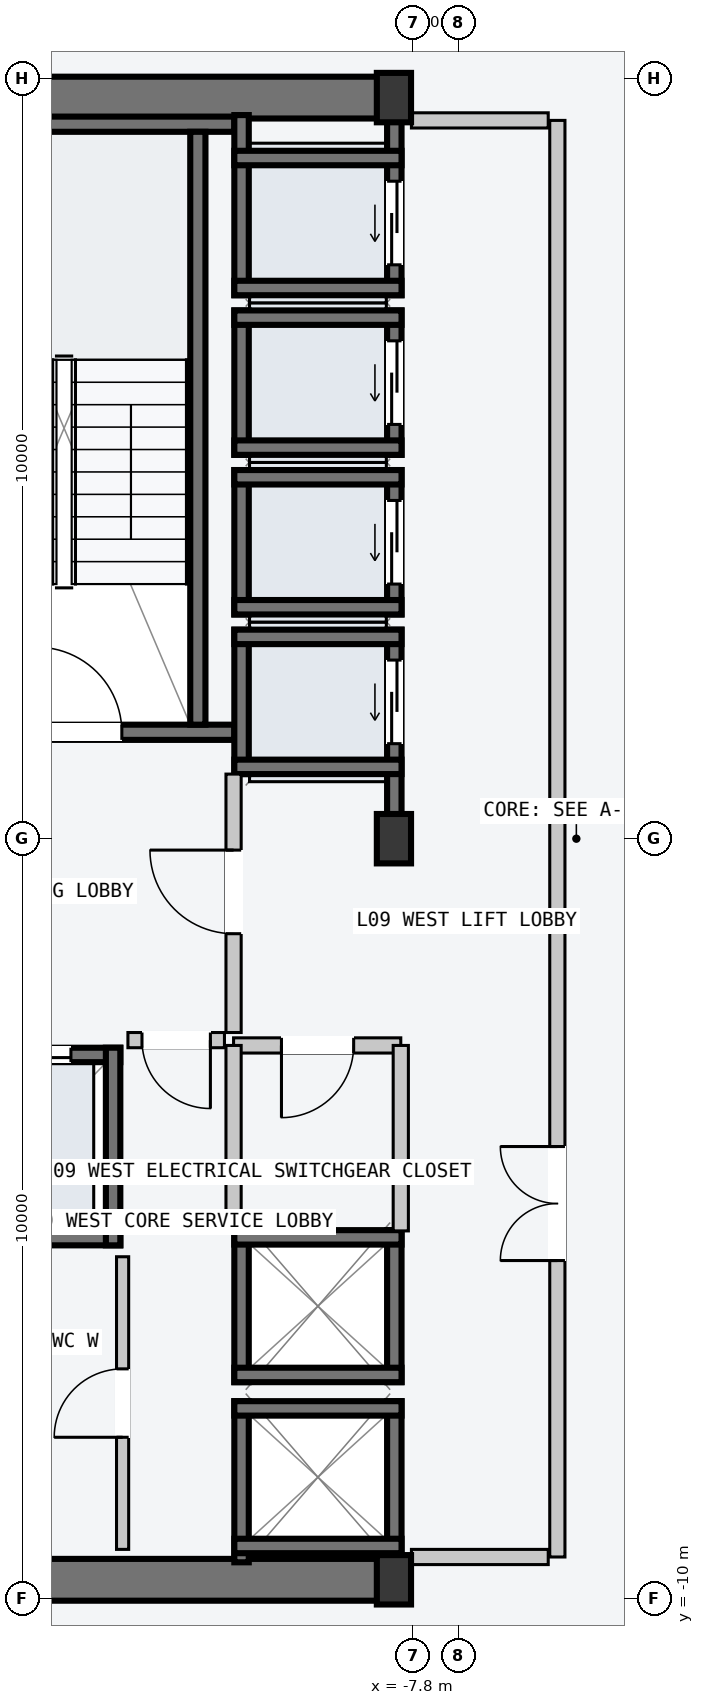
"""IFC4 building model, lengths in metres.
Left out: names, types, materials, properties, quantities, classifications, styles, units other than length and angle.
Written with IfcOpenShell. Run it as: python <this file> out.ifc"""

import sys

from ifc_helpers import new_model, si_unit, direction, frame, frame_2d, origin, origin_2d, place, context, subcontext, project, spatial, rectangle, i_section, extrude, element, fill, save


model = new_model("IFC4")
c1 = context("Model", 3, precision=1e-05, world=origin(), true_north=direction((0.0, 1.0)))
c2 = subcontext(c1, "Body", "Model", "MODEL_VIEW")
j1 = project(units=[si_unit("LENGTHUNIT", "METRE"), si_unit("PLANEANGLEUNIT", "RADIAN")], contexts=[c1])
p1 = place(None, origin())
s1 = spatial("IfcSite", under=j1, at=p1, CompositionType="ELEMENT")
p2 = place(p1, origin())
s2 = spatial("IfcBuilding", under=s1, at=p2, CompositionType="ELEMENT")
p3 = place(p2, frame((0.0, 0.0, 38.4)))
s3 = spatial("IfcBuildingStorey", under=s2, at=p3, CompositionType="ELEMENT", Elevation=38.4)
for number, where, z_axis, x_axis in (
    (1, (-14.53, -9.75, -0.2), (0.0, 0.0, 1.0), (1.0, 0.0, 0.0)),
    (2, (-14.53, 9.75, -0.2), (0.0, 0.0, 1.0), (1.0, 0.0, 0.0)),
):
    element("IfcWall", number, at=place(p3, frame(where, z_axis=z_axis, x_axis=x_axis)), inside=s3, PredefinedType="SHEAR", context=c2, shape_type="SweptSolid", body=[
        extrude(rectangle(XDim=6.46, YDim=0.55, at=frame_2d((3.23, 0.0))), origin(), (0.0, 0.0, 1.0), 3.6),
    ])
p4 = place(p3, frame((-14.25, 1.4, -0.2), z_axis=(0.0, 0.0, 1.0), x_axis=(1.0, 0.0, 0.0)))
e3 = element("IfcWall", 3, at=p4, inside=s3, PredefinedType="SOLIDWALL", context=c2, shape_type="SweptSolid", body=[
    extrude(rectangle(XDim=4.1, YDim=0.2, at=frame_2d((2.05, 0.0))), origin(), (0.0, 0.0, 1.0), 3.6),
])
p5 = place(p4, frame((1.5, 0.0, 0.2)))
e4 = element("IfcOpeningElement", 4, at=p5, cuts=e3, PredefinedType="OPENING", context=c2, shape_type="SweptSolid", body=[
    extrude(rectangle(XDim=1.12, YDim=2.18, at=frame_2d((0.56, 1.09))), frame((0.0, 0.11, 0.0), z_axis=(0.0, -1.0, 0.0), x_axis=(1.0, 0.0, 0.0)), (0.0, 0.0, 1.0), 0.22),
])
p6 = place(p3, frame((-14.25, 9.4, -0.2), z_axis=(0.0, 0.0, 1.0), x_axis=(1.0, 0.0, 0.0)))
e5 = element("IfcWall", 5, at=p6, inside=s3, PredefinedType="SOLIDWALL", context=c2, shape_type="SweptSolid", body=[
    extrude(rectangle(XDim=4.1, YDim=0.2, at=frame_2d((2.05, 0.0))), origin(), (0.0, 0.0, 1.0), 3.6),
])
p7 = place(p3, frame((-10.63, 1.5, -0.2), z_axis=(0.0, 0.0, 1.0), x_axis=(0.0, 1.0, 0.0)))
e6 = element("IfcWall", 6, at=p7, inside=s3, PredefinedType="SOLIDWALL", context=c2, shape_type="SweptSolid", body=[
    extrude(rectangle(XDim=7.8, YDim=0.2, at=frame_2d((3.9, 0.0))), origin(), (0.0, 0.0, 1.0), 3.6),
])
for number, where, z_axis, x_axis in (
    (7, (-8.05, -9.75, 0.0), (0.0, 0.0, 1.0), (1.0, 0.0, 0.0)),
    (8, (-8.05, 0.0, 0.0), (0.0, 0.0, 1.0), (1.0, 0.0, 0.0)),
    (9, (-8.05, 9.75, 0.0), (0.0, 0.0, 1.0), (1.0, 0.0, 0.0)),
):
    element("IfcColumn", number, at=place(p3, frame(where, z_axis=z_axis, x_axis=x_axis)), inside=s3, PredefinedType="COLUMN", context=c2, shape_type="SweptSolid", body=[
        extrude(i_section(OverallWidth=0.45, OverallDepth=0.65, WebThickness=0.025, FlangeThickness=0.04, at=origin_2d()), origin(), (0.0, 0.0, 1.0), 3.6),
    ])
p8 = place(p3, frame((-8.045, 0.21, -0.2), z_axis=(0.0, 0.0, 1.0), x_axis=(0.0, 1.0, 0.0)))
e10 = element("IfcWall", 10, at=p8, inside=s3, PredefinedType="SOLIDWALL", context=c2, shape_type="SweptSolid", body=[
    extrude(rectangle(XDim=2.54, YDim=0.19, at=frame_2d((1.27, 0.0))), origin(), (0.0, 0.0, 1.0), 3.6),
])
p9 = place(p8, frame((1.04, 0.0, 0.2)))
e11 = element("IfcOpeningElement", 11, at=p9, cuts=e10, PredefinedType="OPENING", context=c2, shape_type="SweptSolid", body=[
    extrude(rectangle(XDim=1.1, YDim=2.2, at=frame_2d((0.55, 1.1))), frame((0.0, 0.105, 0.0), z_axis=(0.0, -1.0, 0.0), x_axis=(1.0, 0.0, 0.0)), (0.0, 0.0, 1.0), 0.21),
])
p10 = place(p3, frame((-10.055, 0.85, -0.2), z_axis=(0.0, 0.0, 1.0), x_axis=(0.0, 1.0, 0.0)))
e12 = element("IfcWall", 12, at=p10, inside=s3, PredefinedType="SOLIDWALL", context=c2, shape_type="SweptSolid", body=[
    extrude(rectangle(XDim=1.9, YDim=0.19, at=frame_2d((0.95, 0.0))), origin(), (0.0, 0.0, 1.0), 3.6),
])
for number, where, z_axis, x_axis in (
    (13, (-10.15, 2.655, -0.2), (0.0, 0.0, 1.0), (1.0, 0.0, 0.0)),
    (14, (-10.15, 0.945, -0.2), (0.0, 0.0, 1.0), (1.0, 0.0, 0.0)),
):
    element("IfcWall", number, at=place(p3, frame(where, z_axis=z_axis, x_axis=x_axis)), inside=s3, PredefinedType="SOLIDWALL", context=c2, shape_type="SweptSolid", body=[
        extrude(rectangle(XDim=2.2, YDim=0.19, at=frame_2d((1.1, 0.0))), origin(), (0.0, 0.0, 1.0), 3.6),
    ])
p11 = place(p3, frame((-8.045, 2.95, -0.2), z_axis=(0.0, 0.0, 1.0), x_axis=(0.0, 1.0, 0.0)))
e15 = element("IfcWall", 15, at=p11, inside=s3, PredefinedType="SOLIDWALL", context=c2, shape_type="SweptSolid", body=[
    extrude(rectangle(XDim=1.9, YDim=0.19, at=frame_2d((0.95, 0.0))), origin(), (0.0, 0.0, 1.0), 3.6),
])
p12 = place(p11, frame((0.4, 0.0, 0.2)))
e16 = element("IfcOpeningElement", 16, at=p12, cuts=e15, PredefinedType="OPENING", context=c2, shape_type="SweptSolid", body=[
    extrude(rectangle(XDim=1.1, YDim=2.2, at=frame_2d((0.55, 1.1))), frame((0.0, 0.105, 0.0), z_axis=(0.0, -1.0, 0.0), x_axis=(1.0, 0.0, 0.0)), (0.0, 0.0, 1.0), 0.21),
])
p13 = place(p3, frame((-10.055, 2.95, -0.2), z_axis=(0.0, 0.0, 1.0), x_axis=(0.0, 1.0, 0.0)))
e17 = element("IfcWall", 17, at=p13, inside=s3, PredefinedType="SOLIDWALL", context=c2, shape_type="SweptSolid", body=[
    extrude(rectangle(XDim=1.9, YDim=0.19, at=frame_2d((0.95, 0.0))), origin(), (0.0, 0.0, 1.0), 3.6),
])
for number, where, z_axis, x_axis in (
    (18, (-10.15, 4.755, -0.2), (0.0, 0.0, 1.0), (1.0, 0.0, 0.0)),
    (19, (-10.15, 3.045, -0.2), (0.0, 0.0, 1.0), (1.0, 0.0, 0.0)),
):
    element("IfcWall", number, at=place(p3, frame(where, z_axis=z_axis, x_axis=x_axis)), inside=s3, PredefinedType="SOLIDWALL", context=c2, shape_type="SweptSolid", body=[
        extrude(rectangle(XDim=2.2, YDim=0.19, at=frame_2d((1.1, 0.0))), origin(), (0.0, 0.0, 1.0), 3.6),
    ])
p14 = place(p3, frame((-8.045, 5.05, -0.2), z_axis=(0.0, 0.0, 1.0), x_axis=(0.0, 1.0, 0.0)))
e20 = element("IfcWall", 20, at=p14, inside=s3, PredefinedType="SOLIDWALL", context=c2, shape_type="SweptSolid", body=[
    extrude(rectangle(XDim=1.9, YDim=0.19, at=frame_2d((0.95, 0.0))), origin(), (0.0, 0.0, 1.0), 3.6),
])
p15 = place(p14, frame((0.4, 0.0, 0.2)))
e21 = element("IfcOpeningElement", 21, at=p15, cuts=e20, PredefinedType="OPENING", context=c2, shape_type="SweptSolid", body=[
    extrude(rectangle(XDim=1.1, YDim=2.2, at=frame_2d((0.55, 1.1))), frame((0.0, 0.105, 0.0), z_axis=(0.0, -1.0, 0.0), x_axis=(1.0, 0.0, 0.0)), (0.0, 0.0, 1.0), 0.21),
])
p16 = place(p3, frame((-10.055, 5.05, -0.2), z_axis=(0.0, 0.0, 1.0), x_axis=(0.0, 1.0, 0.0)))
e22 = element("IfcWall", 22, at=p16, inside=s3, PredefinedType="SOLIDWALL", context=c2, shape_type="SweptSolid", body=[
    extrude(rectangle(XDim=1.9, YDim=0.19, at=frame_2d((0.95, 0.0))), origin(), (0.0, 0.0, 1.0), 3.6),
])
for number, where, z_axis, x_axis in (
    (23, (-10.15, 6.855, -0.2), (0.0, 0.0, 1.0), (1.0, 0.0, 0.0)),
    (24, (-10.15, 5.145, -0.2), (0.0, 0.0, 1.0), (1.0, 0.0, 0.0)),
):
    element("IfcWall", number, at=place(p3, frame(where, z_axis=z_axis, x_axis=x_axis)), inside=s3, PredefinedType="SOLIDWALL", context=c2, shape_type="SweptSolid", body=[
        extrude(rectangle(XDim=2.2, YDim=0.19, at=frame_2d((1.1, 0.0))), origin(), (0.0, 0.0, 1.0), 3.6),
    ])
p17 = place(p3, frame((-8.045, 7.15, -0.2), z_axis=(0.0, 0.0, 1.0), x_axis=(0.0, 1.0, 0.0)))
e25 = element("IfcWall", 25, at=p17, inside=s3, PredefinedType="SOLIDWALL", context=c2, shape_type="SweptSolid", body=[
    extrude(rectangle(XDim=2.37, YDim=0.19, at=frame_2d((1.185, 0.0))), origin(), (0.0, 0.0, 1.0), 3.6),
])
p18 = place(p17, frame((0.4, 0.0, 0.2)))
e26 = element("IfcOpeningElement", 26, at=p18, cuts=e25, PredefinedType="OPENING", context=c2, shape_type="SweptSolid", body=[
    extrude(rectangle(XDim=1.1, YDim=2.2, at=frame_2d((0.55, 1.1))), frame((0.0, 0.105, 0.0), z_axis=(0.0, -1.0, 0.0), x_axis=(1.0, 0.0, 0.0)), (0.0, 0.0, 1.0), 0.21),
])
p19 = place(p3, frame((-10.055, 7.15, -0.2), z_axis=(0.0, 0.0, 1.0), x_axis=(0.0, 1.0, 0.0)))
e27 = element("IfcWall", 27, at=p19, inside=s3, PredefinedType="SOLIDWALL", context=c2, shape_type="SweptSolid", body=[
    extrude(rectangle(XDim=2.37, YDim=0.19, at=frame_2d((1.185, 0.0))), origin(), (0.0, 0.0, 1.0), 3.6),
])
for number, where, z_axis, x_axis in (
    (28, (-10.15, 8.955, -0.2), (0.0, 0.0, 1.0), (1.0, 0.0, 0.0)),
    (29, (-10.15, 7.245, -0.2), (0.0, 0.0, 1.0), (1.0, 0.0, 0.0)),
):
    element("IfcWall", number, at=place(p3, frame(where, z_axis=z_axis, x_axis=x_axis)), inside=s3, PredefinedType="SOLIDWALL", context=c2, shape_type="SweptSolid", body=[
        extrude(rectangle(XDim=2.2, YDim=0.19, at=frame_2d((1.1, 0.0))), origin(), (0.0, 0.0, 1.0), 3.6),
    ])
for number, where, z_axis, x_axis in (
    (30, (-8.045, -9.52, -0.2), (0.0, 0.0, 1.0), (0.0, 1.0, 0.0)),
    (31, (-10.055, -9.52, -0.2), (0.0, 0.0, 1.0), (0.0, 1.0, 0.0)),
):
    element("IfcWall", number, at=place(p3, frame(where, z_axis=z_axis, x_axis=x_axis)), inside=s3, PredefinedType="SOLIDWALL", context=c2, shape_type="SweptSolid", body=[
        extrude(rectangle(XDim=2.12, YDim=0.19, at=frame_2d((1.06, 0.0))), origin(), (0.0, 0.0, 1.0), 3.6),
    ])
for number, where, z_axis, x_axis in (
    (32, (-10.15, -7.495, -0.2), (0.0, 0.0, 1.0), (1.0, 0.0, 0.0)),
    (33, (-10.15, -9.305, -0.2), (0.0, 0.0, 1.0), (1.0, 0.0, 0.0)),
):
    element("IfcWall", number, at=place(p3, frame(where, z_axis=z_axis, x_axis=x_axis)), inside=s3, PredefinedType="SOLIDWALL", context=c2, shape_type="SweptSolid", body=[
        extrude(rectangle(XDim=2.2, YDim=0.19, at=frame_2d((1.1, 0.0))), origin(), (0.0, 0.0, 1.0), 3.6),
    ])
for number, where, z_axis, x_axis in (
    (34, (-8.045, -7.15, -0.2), (0.0, 0.0, 1.0), (0.0, 1.0, 0.0)),
    (35, (-10.055, -7.15, -0.2), (0.0, 0.0, 1.0), (0.0, 1.0, 0.0)),
):
    element("IfcWall", number, at=place(p3, frame(where, z_axis=z_axis, x_axis=x_axis)), inside=s3, PredefinedType="SOLIDWALL", context=c2, shape_type="SweptSolid", body=[
        extrude(rectangle(XDim=2.0, YDim=0.19, at=frame_2d((1.0, 0.0))), origin(), (0.0, 0.0, 1.0), 3.6),
    ])
for number, where, z_axis, x_axis in (
    (36, (-10.15, -5.245, -0.2), (0.0, 0.0, 1.0), (1.0, 0.0, 0.0)),
    (37, (-10.15, -7.055, -0.2), (0.0, 0.0, 1.0), (1.0, 0.0, 0.0)),
):
    element("IfcWall", number, at=place(p3, frame(where, z_axis=z_axis, x_axis=x_axis)), inside=s3, PredefinedType="SOLIDWALL", context=c2, shape_type="SweptSolid", body=[
        extrude(rectangle(XDim=2.2, YDim=0.19, at=frame_2d((1.1, 0.0))), origin(), (0.0, 0.0, 1.0), 3.6),
    ])
p20 = place(p3, frame((-14.33, -2.845, -0.2), z_axis=(0.0, 0.0, 1.0), x_axis=(1.0, 0.0, 0.0)))
e38 = element("IfcWall", 38, at=p20, inside=s3, PredefinedType="SOLIDWALL", context=c2, shape_type="SweptSolid", body=[
    extrude(rectangle(XDim=2.68, YDim=0.19, at=frame_2d((1.34, 0.0))), origin(), (0.0, 0.0, 1.0), 3.6),
])
p21 = place(p20, frame((0.83, 0.0, 0.2)))
e39 = element("IfcOpeningElement", 39, at=p21, cuts=e38, PredefinedType="OPENING", context=c2, shape_type="SweptSolid", body=[
    extrude(rectangle(XDim=1.2, YDim=2.2, at=frame_2d((0.6, 1.1))), frame((0.0, 0.105, 0.0), z_axis=(0.0, -1.0, 0.0), x_axis=(1.0, 0.0, 0.0)), (0.0, 0.0, 1.0), 0.21),
])
p22 = place(p3, frame((-14.33, -5.255, -0.2), z_axis=(0.0, 0.0, 1.0), x_axis=(1.0, 0.0, 0.0)))
e40 = element("IfcWall", 40, at=p22, inside=s3, PredefinedType="SOLIDWALL", context=c2, shape_type="SweptSolid", body=[
    extrude(rectangle(XDim=2.68, YDim=0.19, at=frame_2d((1.34, 0.0))), origin(), (0.0, 0.0, 1.0), 3.6),
])
p23 = place(p3, frame((-11.745, -5.35, -0.2), z_axis=(0.0, 0.0, 1.0), x_axis=(0.0, 1.0, 0.0)))
e41 = element("IfcWall", 41, at=p23, inside=s3, PredefinedType="SOLIDWALL", context=c2, shape_type="SweptSolid", body=[
    extrude(rectangle(XDim=2.6, YDim=0.19, at=frame_2d((1.3, 0.0))), origin(), (0.0, 0.0, 1.0), 3.6),
])
p24 = place(p3, frame((-5.9, -9.45, 0.0), z_axis=(0.0, 0.0, 1.0), x_axis=(0.0, 1.0, 0.0)))
e42 = element("IfcWall", 42, at=p24, inside=s3, PredefinedType="PARTITIONING", context=c2, shape_type="SweptSolid", body=[
    extrude(rectangle(XDim=18.9, YDim=0.2, at=frame_2d((9.45, 0.0))), origin(), (0.0, 0.0, 1.0), 3.4),
])
p25 = place(p24, frame((3.9, 0.0, 0.0)))
e43 = element("IfcOpeningElement", 43, at=p25, cuts=e42, PredefinedType="OPENING", context=c2, shape_type="SweptSolid", body=[
    extrude(rectangle(XDim=1.5, YDim=2.2, at=frame_2d((0.75, 1.1))), frame((0.0, 0.11, 0.0), z_axis=(0.0, -1.0, 0.0), x_axis=(1.0, 0.0, 0.0)), (0.0, 0.0, 1.0), 0.22),
])
for number, where, z_axis, x_axis in (
    (44, (-6.02, -9.45, 0.0), (0.0, 0.0, 1.0), (-1.0, 0.0, 0.0)),
    (45, (-6.02, 9.45, 0.0), (0.0, 0.0, 1.0), (-1.0, 0.0, 0.0)),
):
    element("IfcWall", number, at=place(p3, frame(where, z_axis=z_axis, x_axis=x_axis)), inside=s3, PredefinedType="PARTITIONING", context=c2, shape_type="SweptSolid", body=[
        extrude(rectangle(XDim=1.8, YDim=0.2, at=frame_2d((0.9, 0.0))), origin(), (0.0, 0.0, 1.0), 3.4),
    ])
p26 = place(p3, frame((-10.16, -2.55, 0.0), z_axis=(0.0, 0.0, 1.0), x_axis=(0.0, 1.0, 0.0)))
e46 = element("IfcWall", 46, at=p26, inside=s3, PredefinedType="PARTITIONING", context=c2, shape_type="SweptSolid", body=[
    extrude(rectangle(XDim=3.4, YDim=0.2, at=frame_2d((1.7, 0.0))), origin(), (0.0, 0.0, 1.0), 3.4),
])
p27 = place(p26, frame((1.3, 0.0, 0.0)))
e47 = element("IfcOpeningElement", 47, at=p27, cuts=e46, PredefinedType="OPENING", context=c2, shape_type="SweptSolid", body=[
    extrude(rectangle(XDim=1.1, YDim=2.15, at=frame_2d((0.55, 1.075))), frame((0.0, 0.11, 0.0), z_axis=(0.0, -1.0, 0.0), x_axis=(1.0, 0.0, 0.0)), (0.0, 0.0, 1.0), 0.22),
])
p28 = place(p3, frame((-10.28, -2.65, 0.0), z_axis=(0.0, 0.0, 1.0), x_axis=(-1.0, 0.0, 0.0)))
e48 = element("IfcWall", 48, at=p28, inside=s3, PredefinedType="PARTITIONING", context=c2, shape_type="SweptSolid", body=[
    extrude(rectangle(XDim=1.27, YDim=0.2, at=frame_2d((0.635, 0.0))), origin(), (0.0, 0.0, 1.0), 3.4),
])
p29 = place(p28, frame((0.185, 0.0, 0.0)))
e49 = element("IfcOpeningElement", 49, at=p29, cuts=e48, PredefinedType="OPENING", context=c2, shape_type="SweptSolid", body=[
    extrude(rectangle(XDim=0.9, YDim=2.15, at=frame_2d((0.45, 1.075))), frame((0.0, 0.11, 0.0), z_axis=(0.0, -1.0, 0.0), x_axis=(1.0, 0.0, 0.0)), (0.0, 0.0, 1.0), 0.22),
])
p30 = place(p3, frame((-7.96, -2.72, 0.0), z_axis=(0.0, 0.0, 1.0), x_axis=(-1.0, 0.0, 0.0)))
e50 = element("IfcWall", 50, at=p30, inside=s3, PredefinedType="PARTITIONING", context=c2, shape_type="SweptSolid", body=[
    extrude(rectangle(XDim=2.2, YDim=0.2, at=frame_2d((1.1, 0.0))), origin(), (0.0, 0.0, 1.0), 3.4),
])
p31 = place(p30, frame((0.62, 0.0, 0.0)))
e51 = element("IfcOpeningElement", 51, at=p31, cuts=e50, PredefinedType="OPENING", context=c2, shape_type="SweptSolid", body=[
    extrude(rectangle(XDim=0.95, YDim=2.1, at=frame_2d((0.475, 1.05))), frame((0.0, 0.11, 0.0), z_axis=(0.0, -1.0, 0.0), x_axis=(1.0, 0.0, 0.0)), (0.0, 0.0, 1.0), 0.22),
])
for number, where, z_axis, x_axis in (
    (52, (-7.96, -5.16, 0.0), (0.0, 0.0, 1.0), (0.0, 1.0, 0.0)),
    (53, (-10.16, -5.16, 0.0), (0.0, 0.0, 1.0), (0.0, 1.0, 0.0)),
):
    element("IfcWall", number, at=place(p3, frame(where, z_axis=z_axis, x_axis=x_axis)), inside=s3, PredefinedType="PARTITIONING", context=c2, shape_type="SweptSolid", body=[
        extrude(rectangle(XDim=2.44, YDim=0.2, at=frame_2d((1.22, 0.0))), origin(), (0.0, 0.0, 1.0), 3.4),
    ])
p32 = place(p3, frame((-11.62, -9.35, 0.0), z_axis=(0.0, 0.0, 1.0), x_axis=(0.0, 1.0, 0.0)))
e54 = element("IfcWall", 54, at=p32, inside=s3, PredefinedType="PARTITIONING", context=c2, shape_type="SweptSolid", body=[
    extrude(rectangle(XDim=3.85, YDim=0.16, at=frame_2d((1.925, 0.0))), origin(), (0.0, 0.0, 1.0), 3.4),
])
p33 = place(p32, frame((1.475, 0.0, 0.0)))
e55 = element("IfcOpeningElement", 55, at=p33, cuts=e54, PredefinedType="OPENING", context=c2, shape_type="SweptSolid", body=[
    extrude(rectangle(XDim=0.9, YDim=2.15, at=frame_2d((0.45, 1.075))), frame((0.0, 0.09, 0.0), z_axis=(0.0, -1.0, 0.0), x_axis=(1.0, 0.0, 0.0)), (0.0, 0.0, 1.0), 0.18),
])
p34 = place(p5, origin())
e56 = element("IfcDoor", 56, at=p34, inside=s3, OperationType="SINGLE_SWING_LEFT", PredefinedType="DOOR", context=c2, shape_type="SweptSolid", body=[
    extrude(rectangle(XDim=1.12, YDim=2.18, at=frame_2d((0.56, 1.09))), frame((0.0, 0.025, 0.0), z_axis=(0.0, -1.0, 0.0), x_axis=(1.0, 0.0, 0.0)), (0.0, 0.0, 1.0), 0.05),
])
fill(e4, e56)
p35 = place(p9, origin())
e57 = element("IfcDoor", 57, at=p35, inside=s3, OperationType="SLIDING_TO_LEFT", PredefinedType="DOOR", context=c2, shape_type="SweptSolid", body=[
    extrude(rectangle(XDim=1.1, YDim=2.2, at=frame_2d((0.55, 1.1))), frame((0.0, 0.025, 0.0), z_axis=(0.0, -1.0, 0.0), x_axis=(1.0, 0.0, 0.0)), (0.0, 0.0, 1.0), 0.05),
])
fill(e11, e57)
p36 = place(p12, origin())
e58 = element("IfcDoor", 58, at=p36, inside=s3, OperationType="SLIDING_TO_LEFT", PredefinedType="DOOR", context=c2, shape_type="SweptSolid", body=[
    extrude(rectangle(XDim=1.1, YDim=2.2, at=frame_2d((0.55, 1.1))), frame((0.0, 0.025, 0.0), z_axis=(0.0, -1.0, 0.0), x_axis=(1.0, 0.0, 0.0)), (0.0, 0.0, 1.0), 0.05),
])
fill(e16, e58)
p37 = place(p15, origin())
e59 = element("IfcDoor", 59, at=p37, inside=s3, OperationType="SLIDING_TO_LEFT", PredefinedType="DOOR", context=c2, shape_type="SweptSolid", body=[
    extrude(rectangle(XDim=1.1, YDim=2.2, at=frame_2d((0.55, 1.1))), frame((0.0, 0.025, 0.0), z_axis=(0.0, -1.0, 0.0), x_axis=(1.0, 0.0, 0.0)), (0.0, 0.0, 1.0), 0.05),
])
fill(e21, e59)
p38 = place(p18, origin())
e60 = element("IfcDoor", 60, at=p38, inside=s3, OperationType="SLIDING_TO_LEFT", PredefinedType="DOOR", context=c2, shape_type="SweptSolid", body=[
    extrude(rectangle(XDim=1.1, YDim=2.2, at=frame_2d((0.55, 1.1))), frame((0.0, 0.025, 0.0), z_axis=(0.0, -1.0, 0.0), x_axis=(1.0, 0.0, 0.0)), (0.0, 0.0, 1.0), 0.05),
])
fill(e26, e60)
p39 = place(p21, origin())
e61 = element("IfcDoor", 61, at=p39, inside=s3, OperationType="SLIDING_TO_LEFT", PredefinedType="DOOR", context=c2, shape_type="SweptSolid", body=[
    extrude(rectangle(XDim=1.2, YDim=2.2, at=frame_2d((0.6, 1.1))), frame((0.0, 0.025, 0.0), z_axis=(0.0, -1.0, 0.0), x_axis=(1.0, 0.0, 0.0)), (0.0, 0.0, 1.0), 0.05),
])
fill(e39, e61)
p40 = place(p25, origin())
e62 = element("IfcDoor", 62, at=p40, inside=s3, OperationType="DOUBLE_DOOR_SINGLE_SWING", PredefinedType="DOOR", context=c2, shape_type="SweptSolid", body=[
    extrude(rectangle(XDim=1.5, YDim=2.2, at=frame_2d((0.75, 1.1))), frame((0.0, 0.025, 0.0), z_axis=(0.0, -1.0, 0.0), x_axis=(1.0, 0.0, 0.0)), (0.0, 0.0, 1.0), 0.05),
])
fill(e43, e62)
p41 = place(p27, origin())
e63 = element("IfcDoor", 63, at=p41, inside=s3, OperationType="SINGLE_SWING_RIGHT", PredefinedType="DOOR", context=c2, shape_type="SweptSolid", body=[
    extrude(rectangle(XDim=1.1, YDim=2.15, at=frame_2d((0.55, 1.075))), frame((0.0, 0.025, 0.0), z_axis=(0.0, -1.0, 0.0), x_axis=(1.0, 0.0, 0.0)), (0.0, 0.0, 1.0), 0.05),
])
fill(e47, e63)
p42 = place(p29, origin())
e64 = element("IfcDoor", 64, at=p42, inside=s3, OperationType="SINGLE_SWING_LEFT", PredefinedType="DOOR", context=c2, shape_type="SweptSolid", body=[
    extrude(rectangle(XDim=0.9, YDim=2.15, at=frame_2d((0.45, 1.075))), frame((0.0, 0.025, 0.0), z_axis=(0.0, -1.0, 0.0), x_axis=(1.0, 0.0, 0.0)), (0.0, 0.0, 1.0), 0.05),
])
fill(e49, e64)
p43 = place(p31, origin())
e65 = element("IfcDoor", 65, at=p43, inside=s3, OperationType="SINGLE_SWING_RIGHT", PredefinedType="DOOR", context=c2, shape_type="SweptSolid", body=[
    extrude(rectangle(XDim=0.95, YDim=2.1, at=frame_2d((0.475, 1.05))), frame((0.0, 0.025, 0.0), z_axis=(0.0, -1.0, 0.0), x_axis=(1.0, 0.0, 0.0)), (0.0, 0.0, 1.0), 0.05),
])
fill(e51, e65)
p44 = place(p33, origin())
e66 = element("IfcDoor", 66, at=p44, inside=s3, OperationType="SINGLE_SWING_LEFT", PredefinedType="DOOR", context=c2, shape_type="SweptSolid", body=[
    extrude(rectangle(XDim=0.9, YDim=2.15, at=frame_2d((0.45, 1.075))), frame((0.0, 0.025, 0.0), z_axis=(0.0, -1.0, 0.0), x_axis=(1.0, 0.0, 0.0)), (0.0, 0.0, 1.0), 0.05),
])
fill(e55, e66)
save(model, sys.argv[1])
